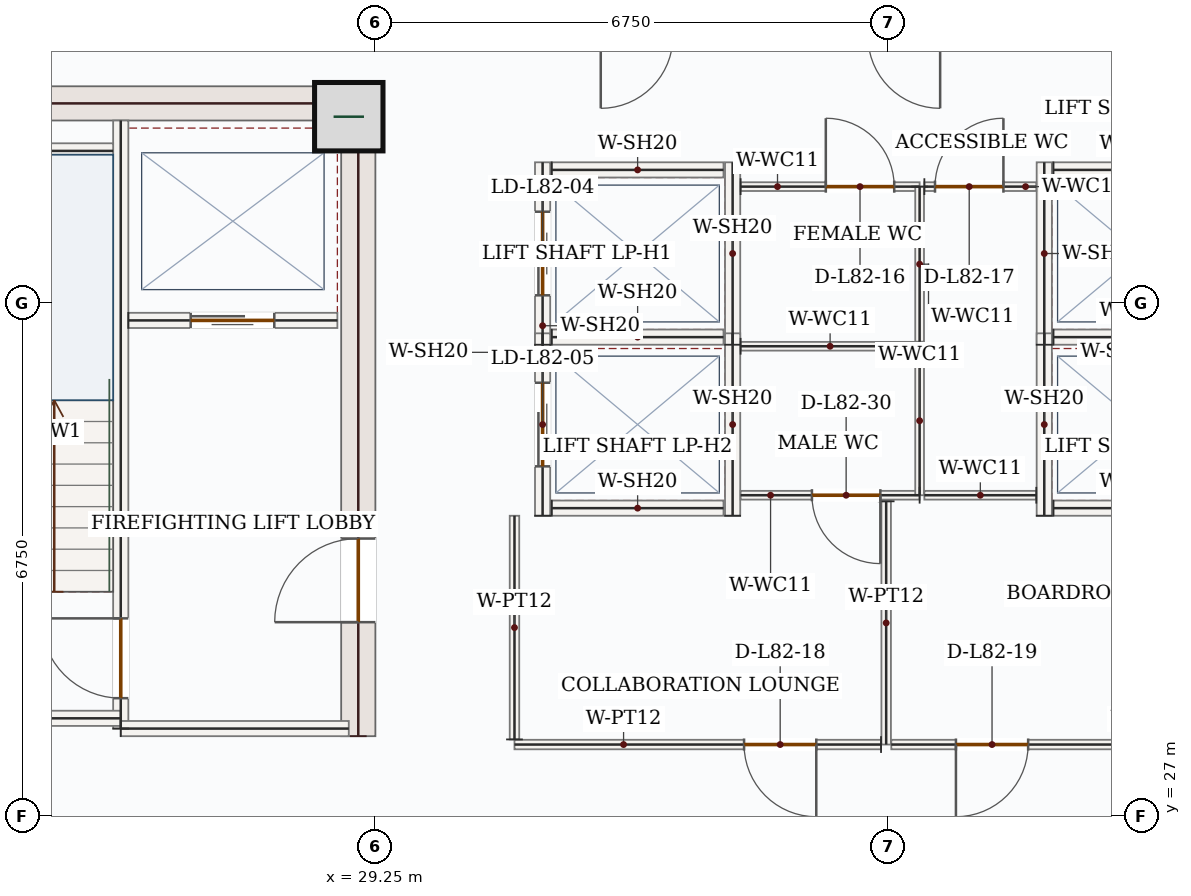
"""IFC4 building model, lengths in metres.
Left out: names, types, materials, properties, quantities, classifications, styles, units other than length and angle.
Written with IfcOpenShell. Run it as: python <this file> out.ifc"""

import sys

from ifc_helpers import new_model, si_unit, direction, frame, frame_2d, origin, origin_2d, place, context, subcontext, project, spatial, rectangle, extrude, source, transform, mapped, element, fill, save


model = new_model("IFC4")
c1 = context("Model", 3, precision=1e-05, world=origin(), true_north=direction((0.0, 1.0)))
c2 = subcontext(c1, "Body", "Model", "MODEL_VIEW")
j1 = project(units=[si_unit("LENGTHUNIT", "METRE"), si_unit("PLANEANGLEUNIT", "RADIAN")], contexts=[c1])
p1 = place(None, origin())
s1 = spatial("IfcSite", under=j1, at=p1, CompositionType="ELEMENT")
p2 = place(p1, origin())
s2 = spatial("IfcBuilding", under=s1, at=p2, CompositionType="ELEMENT")
p3 = place(p2, frame((0.0, 0.0, 338.55)))
s3 = spatial("IfcBuildingStorey", under=s2, at=p3, CompositionType="ELEMENT", Elevation=338.55)
p4 = place(p3, frame((29.025, 28.05, 0.0), z_axis=(0.0, 0.0, 1.0), x_axis=(0.0, 1.0, 0.0)))
e1 = element("IfcWall", 1, at=p4, inside=s3, PredefinedType="SHEAR", context=c2, shape_type="SweptSolid", body=[
    extrude(rectangle(XDim=8.55, YDim=0.45, at=frame_2d((4.275, 0.0))), origin(), (0.0, 0.0, 1.0), 3.5),
])
p5 = place(p4, frame((1.5, 0.0, 0.0)))
e2 = element("IfcOpeningElement", 2, at=p5, cuts=e1, PredefinedType="OPENING", context=c2, shape_type="SweptSolid", body=[
    extrude(rectangle(XDim=1.1, YDim=2.2, at=frame_2d((0.55, 1.1))), frame((0.0, 0.235, 0.0), z_axis=(0.0, -1.0, 0.0), x_axis=(1.0, 0.0, 0.0)), (0.0, 0.0, 1.0), 0.47),
])
m1 = source(origin(), c2, "Body", "SweptSolid", [
    extrude(rectangle(XDim=7.1, YDim=0.45, at=frame_2d((3.55, 0.0))), origin(), (0.0, 0.0, 1.0), 3.5),
])
p6 = place(p3, frame((21.7, 36.375, 0.0), z_axis=(0.0, 0.0, 1.0), x_axis=(1.0, 0.0, 0.0)))
e3 = element("IfcWall", 3, at=p6, inside=s3, PredefinedType="SHEAR", context=c2, shape_type="MappedRepresentation", body=[
    mapped(m1, transform((0.0, 0.0, 0.0), x_axis=(1.0, 0.0, 0.0), y_axis=(0.0, 1.0, 0.0), z_axis=(0.0, 0.0, 1.0), scale=1.0)),
])
m2 = source(origin(), c2, "Body", "SweptSolid", [
    extrude(rectangle(XDim=0.9, YDim=0.9, at=origin_2d()), origin(), (0.0, 0.0, 1.0), 3.75),
])
p7 = place(p3, frame((28.9, 36.2, 0.0), z_axis=(0.0, 0.0, 1.0), x_axis=(1.0, 0.0, 0.0)))
e4 = element("IfcColumn", 4, at=p7, inside=s3, PredefinedType="COLUMN", context=c2, shape_type="MappedRepresentation", body=[
    mapped(m2, transform((0.0, 0.0, 0.0), x_axis=(1.0, 0.0, 0.0), y_axis=(0.0, 1.0, 0.0), z_axis=(0.0, 0.0, 1.0), scale=1.0)),
])
p8 = place(p3, frame((25.9, 28.15, 0.0), z_axis=(0.0, 0.0, 1.0), x_axis=(0.0, 1.0, 0.0)))
e5 = element("IfcWall", 5, at=p8, inside=s3, PredefinedType="SOLIDWALL", context=c2, shape_type="SweptSolid", body=[
    extrude(rectangle(XDim=8.0, YDim=0.2, at=frame_2d((4.0, 0.0))), origin(), (0.0, 0.0, 1.0), 3.5),
])
p9 = place(p8, frame((0.4, 0.0, 0.0)))
e6 = element("IfcOpeningElement", 6, at=p9, cuts=e5, PredefinedType="OPENING", context=c2, shape_type="SweptSolid", body=[
    extrude(rectangle(XDim=1.05, YDim=2.15, at=frame_2d((0.525, 1.075))), frame((0.0, 0.11, 0.0), z_axis=(0.0, -1.0, 0.0), x_axis=(1.0, 0.0, 0.0)), (0.0, 0.0, 1.0), 0.22),
])
m3 = source(origin(), c2, "Body", "SweptSolid", [
    extrude(rectangle(XDim=4.25, YDim=0.2, at=frame_2d((2.125, 0.0))), origin(), (0.0, 0.0, 1.0), 3.5),
])
p10 = place(p3, frame((21.65, 28.285, 0.0), z_axis=(0.0, 0.0, 1.0), x_axis=(1.0, 0.0, 0.0)))
e7 = element("IfcWall", 7, at=p10, inside=s3, PredefinedType="SOLIDWALL", context=c2, shape_type="MappedRepresentation", body=[
    mapped(m3, transform((0.0, 0.0, 0.0), x_axis=(1.0, 0.0, 0.0), y_axis=(0.0, 1.0, 0.0), z_axis=(0.0, 0.0, 1.0), scale=1.0)),
])
m4 = source(origin(), c2, "Body", "SweptSolid", [
    extrude(rectangle(XDim=3.0, YDim=0.2, at=frame_2d((1.5, 0.0))), origin(), (0.0, 0.0, 1.0), 3.5),
])
p11 = place(p3, frame((25.9, 28.15, 0.0), z_axis=(0.0, 0.0, 1.0), x_axis=(1.0, 0.0, 0.0)))
e8 = element("IfcWall", 8, at=p11, inside=s3, PredefinedType="SOLIDWALL", context=c2, shape_type="MappedRepresentation", body=[
    mapped(m4, transform((0.0, 0.0, 0.0), x_axis=(1.0, 0.0, 0.0), y_axis=(0.0, 1.0, 0.0), z_axis=(0.0, 0.0, 1.0), scale=1.0)),
])
m5 = source(origin(), c2, "Body", "SweptSolid", [
    extrude(rectangle(XDim=3.25, YDim=0.2, at=frame_2d((1.625, 0.0))), origin(), (0.0, 0.0, 1.0), 3.5),
])
p12 = place(p3, frame((22.55, 35.75, 0.0), z_axis=(0.0, 0.0, 1.0), x_axis=(1.0, 0.0, 0.0)))
e9 = element("IfcWall", 9, at=p12, inside=s3, PredefinedType="SOLIDWALL", context=c2, shape_type="MappedRepresentation", body=[
    mapped(m5, transform((0.0, 0.0, 0.0), x_axis=(1.0, 0.0, 0.0), y_axis=(0.0, 1.0, 0.0), z_axis=(0.0, 0.0, 1.0), scale=1.0)),
])
p13 = place(p3, frame((26.0, 33.52, 0.0), z_axis=(0.0, 0.0, 1.0), x_axis=(1.0, 0.0, 0.0)))
e10 = element("IfcWall", 10, at=p13, inside=s3, PredefinedType="SOLIDWALL", context=c2, shape_type="SweptSolid", body=[
    extrude(rectangle(XDim=2.75, YDim=0.2, at=frame_2d((1.375, 0.0))), origin(), (0.0, 0.0, 1.0), 3.5),
])
p14 = place(p13, frame((0.82, 0.0, 0.0)))
e11 = element("IfcOpeningElement", 11, at=p14, cuts=e10, PredefinedType="OPENING", context=c2, shape_type="SweptSolid", body=[
    extrude(rectangle(XDim=1.1, YDim=2.15, at=frame_2d((0.55, 1.075))), frame((0.0, 0.11, 0.0), z_axis=(0.0, -1.0, 0.0), x_axis=(1.0, 0.0, 0.0)), (0.0, 0.0, 1.0), 0.22),
])
p15 = place(p3, frame((31.45, 33.2, 0.0), z_axis=(0.0, 0.0, 1.0), x_axis=(0.0, 1.0, 0.0)))
e12 = element("IfcWall", 12, at=p15, inside=s3, PredefinedType="SOLIDWALL", context=c2, shape_type="SweptSolid", body=[
    extrude(rectangle(XDim=2.4, YDim=0.2, at=frame_2d((1.2, 0.0))), origin(), (0.0, 0.0, 1.0), 3.5),
])
p16 = place(p15, frame((0.65, 0.0, 0.0)))
e13 = element("IfcOpeningElement", 13, at=p16, cuts=e12, PredefinedType="OPENING", context=c2, shape_type="SweptSolid", body=[
    extrude(rectangle(XDim=1.1, YDim=2.15, at=frame_2d((0.55, 1.075))), frame((0.0, 0.11, 0.0), z_axis=(0.0, -1.0, 0.0), x_axis=(1.0, 0.0, 0.0)), (0.0, 0.0, 1.0), 0.22),
])
m6 = source(origin(), c2, "Body", "SweptSolid", [
    extrude(rectangle(XDim=2.4, YDim=0.2, at=frame_2d((1.2, 0.0))), origin(), (0.0, 0.0, 1.0), 3.5),
])
p17 = place(p3, frame((33.95, 33.2, 0.0), z_axis=(0.0, 0.0, 1.0), x_axis=(0.0, 1.0, 0.0)))
e14 = element("IfcWall", 14, at=p17, inside=s3, PredefinedType="SOLIDWALL", context=c2, shape_type="MappedRepresentation", body=[
    mapped(m6, transform((0.0, 0.0, 0.0), x_axis=(1.0, 0.0, 0.0), y_axis=(0.0, 1.0, 0.0), z_axis=(0.0, 0.0, 1.0), scale=1.0)),
])
m7 = source(origin(), c2, "Body", "SweptSolid", [
    extrude(rectangle(XDim=2.26, YDim=0.2, at=frame_2d((1.13, 0.0))), origin(), (0.0, 0.0, 1.0), 3.5),
])
for number, where, z_axis, x_axis in (
    (15, (31.57, 33.3, 0.0), (0.0, 0.0, 1.0), (1.0, 0.0, 0.0)),
    (16, (31.57, 35.5, 0.0), (0.0, 0.0, 1.0), (1.0, 0.0, 0.0)),
):
    element("IfcWall", number, at=place(p3, frame(where, z_axis=z_axis, x_axis=x_axis)), inside=s3, PredefinedType="SOLIDWALL", context=c2, shape_type="MappedRepresentation", body=[
        mapped(m7, transform((0.0, 0.0, 0.0), x_axis=(1.0, 0.0, 0.0), y_axis=(0.0, 1.0, 0.0), z_axis=(0.0, 0.0, 1.0), scale=1.0)),
    ])
p18 = place(p3, frame((31.45, 30.95, 0.0), z_axis=(0.0, 0.0, 1.0), x_axis=(0.0, 1.0, 0.0)))
e17 = element("IfcWall", 17, at=p18, inside=s3, PredefinedType="SOLIDWALL", context=c2, shape_type="SweptSolid", body=[
    extrude(rectangle(XDim=2.4, YDim=0.2, at=frame_2d((1.2, 0.0))), origin(), (0.0, 0.0, 1.0), 3.5),
])
p19 = place(p18, frame((0.65, 0.0, 0.0)))
e18 = element("IfcOpeningElement", 18, at=p19, cuts=e17, PredefinedType="OPENING", context=c2, shape_type="SweptSolid", body=[
    extrude(rectangle(XDim=1.1, YDim=2.15, at=frame_2d((0.55, 1.075))), frame((0.0, 0.11, 0.0), z_axis=(0.0, -1.0, 0.0), x_axis=(1.0, 0.0, 0.0)), (0.0, 0.0, 1.0), 0.22),
])
p20 = place(p3, frame((33.95, 30.95, 0.0), z_axis=(0.0, 0.0, 1.0), x_axis=(0.0, 1.0, 0.0)))
e19 = element("IfcWall", 19, at=p20, inside=s3, PredefinedType="SOLIDWALL", context=c2, shape_type="MappedRepresentation", body=[
    mapped(m6, transform((0.0, 0.0, 0.0), x_axis=(1.0, 0.0, 0.0), y_axis=(0.0, 1.0, 0.0), z_axis=(0.0, 0.0, 1.0), scale=1.0)),
])
p21 = place(p3, frame((31.57, 31.05, 0.0), z_axis=(0.0, 0.0, 1.0), x_axis=(1.0, 0.0, 0.0)))
e20 = element("IfcWall", 20, at=p21, inside=s3, PredefinedType="SOLIDWALL", context=c2, shape_type="MappedRepresentation", body=[
    mapped(m7, transform((0.0, 0.0, 0.0), x_axis=(1.0, 0.0, 0.0), y_axis=(0.0, 1.0, 0.0), z_axis=(0.0, 0.0, 1.0), scale=1.0)),
])
p22 = place(p3, frame((38.05, 33.2, 0.0), z_axis=(0.0, 0.0, 1.0), x_axis=(0.0, 1.0, 0.0)))
e21 = element("IfcWall", 21, at=p22, inside=s3, PredefinedType="SOLIDWALL", context=c2, shape_type="MappedRepresentation", body=[
    mapped(m6, transform((0.0, 0.0, 0.0), x_axis=(1.0, 0.0, 0.0), y_axis=(0.0, 1.0, 0.0), z_axis=(0.0, 0.0, 1.0), scale=1.0)),
])
for number, where, z_axis, x_axis in (
    (22, (38.17, 33.3, 0.0), (0.0, 0.0, 1.0), (1.0, 0.0, 0.0)),
    (23, (38.17, 35.5, 0.0), (0.0, 0.0, 1.0), (1.0, 0.0, 0.0)),
):
    element("IfcWall", number, at=place(p3, frame(where, z_axis=z_axis, x_axis=x_axis)), inside=s3, PredefinedType="SOLIDWALL", context=c2, shape_type="MappedRepresentation", body=[
        mapped(m7, transform((0.0, 0.0, 0.0), x_axis=(1.0, 0.0, 0.0), y_axis=(0.0, 1.0, 0.0), z_axis=(0.0, 0.0, 1.0), scale=1.0)),
    ])
p23 = place(p3, frame((38.05, 30.95, 0.0), z_axis=(0.0, 0.0, 1.0), x_axis=(0.0, 1.0, 0.0)))
e24 = element("IfcWall", 24, at=p23, inside=s3, PredefinedType="SOLIDWALL", context=c2, shape_type="MappedRepresentation", body=[
    mapped(m6, transform((0.0, 0.0, 0.0), x_axis=(1.0, 0.0, 0.0), y_axis=(0.0, 1.0, 0.0), z_axis=(0.0, 0.0, 1.0), scale=1.0)),
])
p24 = place(p3, frame((38.17, 31.05, 0.0), z_axis=(0.0, 0.0, 1.0), x_axis=(1.0, 0.0, 0.0)))
e25 = element("IfcWall", 25, at=p24, inside=s3, PredefinedType="SOLIDWALL", context=c2, shape_type="MappedRepresentation", body=[
    mapped(m7, transform((0.0, 0.0, 0.0), x_axis=(1.0, 0.0, 0.0), y_axis=(0.0, 1.0, 0.0), z_axis=(0.0, 0.0, 1.0), scale=1.0)),
])
p25 = place(p3, frame((36.41, 31.22, 0.0), z_axis=(0.0, 0.0, 1.0), x_axis=(-1.0, 0.0, 0.0)))
e26 = element("IfcWall", 26, at=p25, inside=s3, PredefinedType="PARTITIONING", context=c2, shape_type="SweptSolid", body=[
    extrude(rectangle(XDim=2.355, YDim=0.115, at=frame_2d((1.177, 0.0))), origin(), (0.0, 0.0, 1.0), 3.5),
])
p26 = place(p25, frame((0.517, 0.0, 0.0)))
e27 = element("IfcOpeningElement", 27, at=p26, cuts=e26, PredefinedType="OPENING", context=c2, shape_type="SweptSolid", body=[
    extrude(rectangle(XDim=0.9, YDim=2.1, at=frame_2d((0.45, 1.05))), frame((0.0, 0.067, 0.0), z_axis=(0.0, -1.0, 0.0), x_axis=(1.0, 0.0, 0.0)), (0.0, 0.0, 1.0), 0.135),
])
m8 = source(origin(), c2, "Body", "SweptSolid", [
    extrude(rectangle(XDim=2.355, YDim=0.115, at=frame_2d((1.177, 0.0))), origin(), (0.0, 0.0, 1.0), 3.5),
])
p27 = place(p3, frame((34.055, 33.18, 0.0), z_axis=(0.0, 0.0, 1.0), x_axis=(1.0, 0.0, 0.0)))
e28 = element("IfcWall", 28, at=p27, inside=s3, PredefinedType="PARTITIONING", context=c2, shape_type="MappedRepresentation", body=[
    mapped(m8, transform((0.0, 0.0, 0.0), x_axis=(1.0, 0.0, 0.0), y_axis=(0.0, 1.0, 0.0), z_axis=(0.0, 0.0, 1.0), scale=1.0)),
])
m9 = source(origin(), c2, "Body", "SweptSolid", [
    extrude(rectangle(XDim=1.96, YDim=0.115, at=frame_2d((0.98, 0.0))), origin(), (0.0, 0.0, 1.0), 3.5),
])
p28 = place(p3, frame((36.41, 33.18, 0.0), z_axis=(0.0, 0.0, 1.0), x_axis=(0.0, -1.0, 0.0)))
e29 = element("IfcWall", 29, at=p28, inside=s3, PredefinedType="PARTITIONING", context=c2, shape_type="MappedRepresentation", body=[
    mapped(m9, transform((0.0, 0.0, 0.0), x_axis=(1.0, 0.0, 0.0), y_axis=(0.0, 1.0, 0.0), z_axis=(0.0, 0.0, 1.0), scale=1.0)),
])
p29 = place(p3, frame((34.055, 35.28, 0.0), z_axis=(0.0, 0.0, 1.0), x_axis=(1.0, 0.0, 0.0)))
e30 = element("IfcWall", 30, at=p29, inside=s3, PredefinedType="PARTITIONING", context=c2, shape_type="SweptSolid", body=[
    extrude(rectangle(XDim=2.355, YDim=0.115, at=frame_2d((1.177, 0.0))), origin(), (0.0, 0.0, 1.0), 3.5),
])
p30 = place(p29, frame((1.121, 0.0, 0.0)))
e31 = element("IfcOpeningElement", 31, at=p30, cuts=e30, PredefinedType="OPENING", context=c2, shape_type="SweptSolid", body=[
    extrude(rectangle(XDim=0.9, YDim=2.1, at=frame_2d((0.45, 1.05))), frame((0.0, 0.067, 0.0), z_axis=(0.0, -1.0, 0.0), x_axis=(1.0, 0.0, 0.0)), (0.0, 0.0, 1.0), 0.135),
])
m10 = source(origin(), c2, "Body", "SweptSolid", [
    extrude(rectangle(XDim=2.04, YDim=0.115, at=frame_2d((1.02, 0.0))), origin(), (0.0, 0.0, 1.0), 3.5),
])
p31 = place(p3, frame((36.41, 35.28, 0.0), z_axis=(0.0, 0.0, 1.0), x_axis=(0.0, -1.0, 0.0)))
e32 = element("IfcWall", 32, at=p31, inside=s3, PredefinedType="PARTITIONING", context=c2, shape_type="MappedRepresentation", body=[
    mapped(m10, transform((0.0, 0.0, 0.0), x_axis=(1.0, 0.0, 0.0), y_axis=(0.0, 1.0, 0.0), z_axis=(0.0, 0.0, 1.0), scale=1.0)),
])
m11 = source(origin(), c2, "Body", "SweptSolid", [
    extrude(rectangle(XDim=1.473, YDim=0.115, at=frame_2d((0.736, 0.0))), origin(), (0.0, 0.0, 1.0), 3.5),
])
p32 = place(p3, frame((37.945, 31.22, 0.0), z_axis=(0.0, 0.0, 1.0), x_axis=(-1.0, 0.0, 0.0)))
e33 = element("IfcWall", 33, at=p32, inside=s3, PredefinedType="PARTITIONING", context=c2, shape_type="MappedRepresentation", body=[
    mapped(m11, transform((0.0, 0.0, 0.0), x_axis=(1.0, 0.0, 0.0), y_axis=(0.0, 1.0, 0.0), z_axis=(0.0, 0.0, 1.0), scale=1.0)),
])
p33 = place(p3, frame((36.472, 35.28, 0.0), z_axis=(0.0, 0.0, 1.0), x_axis=(1.0, 0.0, 0.0)))
e34 = element("IfcWall", 34, at=p33, inside=s3, PredefinedType="PARTITIONING", context=c2, shape_type="SweptSolid", body=[
    extrude(rectangle(XDim=1.473, YDim=0.115, at=frame_2d((0.736, 0.0))), origin(), (0.0, 0.0, 1.0), 3.5),
])
p34 = place(p33, frame((0.14, 0.0, 0.0)))
e35 = element("IfcOpeningElement", 35, at=p34, cuts=e34, PredefinedType="OPENING", context=c2, shape_type="SweptSolid", body=[
    extrude(rectangle(XDim=0.9, YDim=2.1, at=frame_2d((0.45, 1.05))), frame((0.0, 0.067, 0.0), z_axis=(0.0, -1.0, 0.0), x_axis=(1.0, 0.0, 0.0)), (0.0, 0.0, 1.0), 0.135),
])
m12 = source(origin(), c2, "Body", "SweptSolid", [
    extrude(rectangle(XDim=3.2, YDim=0.125, at=frame_2d((1.6, 0.0))), origin(), (0.0, 0.0, 1.0), 3.5),
])
p35 = place(p3, frame((35.97, 31.14, 0.0), z_axis=(0.0, 0.0, 1.0), x_axis=(0.0, -1.0, 0.0)))
e36 = element("IfcWall", 36, at=p35, inside=s3, PredefinedType="PARTITIONING", context=c2, shape_type="MappedRepresentation", body=[
    mapped(m12, transform((0.0, 0.0, 0.0), x_axis=(1.0, 0.0, 0.0), y_axis=(0.0, 1.0, 0.0), z_axis=(0.0, 0.0, 1.0), scale=1.0)),
])
p36 = place(p3, frame((35.903, 27.94, 0.0), z_axis=(0.0, 0.0, 1.0), x_axis=(-1.0, 0.0, 0.0)))
e37 = element("IfcWall", 37, at=p36, inside=s3, PredefinedType="PARTITIONING", context=c2, shape_type="SweptSolid", body=[
    extrude(rectangle(XDim=4.823, YDim=0.125, at=frame_2d((2.411, 0.0))), origin(), (0.0, 0.0, 1.0), 3.5),
])
p37 = place(p36, frame((0.852, 0.0, 0.0)))
e38 = element("IfcOpeningElement", 38, at=p37, cuts=e37, PredefinedType="OPENING", context=c2, shape_type="SweptSolid", body=[
    extrude(rectangle(XDim=0.95, YDim=2.15, at=frame_2d((0.475, 1.075))), frame((0.0, 0.073, 0.0), z_axis=(0.0, -1.0, 0.0), x_axis=(1.0, 0.0, 0.0)), (0.0, 0.0, 1.0), 0.145),
])
m13 = source(origin(), c2, "Body", "SweptSolid", [
    extrude(rectangle(XDim=2.942, YDim=0.125, at=frame_2d((1.471, 0.0))), origin(), (0.0, 0.0, 1.0), 3.5),
])
p38 = place(p3, frame((31.08, 28.008, 0.0), z_axis=(0.0, 0.0, 1.0), x_axis=(0.0, 1.0, 0.0)))
e39 = element("IfcWall", 39, at=p38, inside=s3, PredefinedType="PARTITIONING", context=c2, shape_type="MappedRepresentation", body=[
    mapped(m13, transform((0.0, 0.0, 0.0), x_axis=(1.0, 0.0, 0.0), y_axis=(0.0, 1.0, 0.0), z_axis=(0.0, 0.0, 1.0), scale=1.0)),
])
p39 = place(p3, frame((40.853, 27.94, 0.0), z_axis=(0.0, 0.0, 1.0), x_axis=(-1.0, 0.0, 0.0)))
e40 = element("IfcWall", 40, at=p39, inside=s3, PredefinedType="PARTITIONING", context=c2, shape_type="SweptSolid", body=[
    extrude(rectangle(XDim=4.815, YDim=0.125, at=frame_2d((2.407, 0.0))), origin(), (0.0, 0.0, 1.0), 3.5),
])
p40 = place(p39, frame((3.015, 0.0, 0.0)))
e41 = element("IfcOpeningElement", 41, at=p40, cuts=e40, PredefinedType="OPENING", context=c2, shape_type="SweptSolid", body=[
    extrude(rectangle(XDim=0.95, YDim=2.15, at=frame_2d((0.475, 1.075))), frame((0.0, 0.073, 0.0), z_axis=(0.0, -1.0, 0.0), x_axis=(1.0, 0.0, 0.0)), (0.0, 0.0, 1.0), 0.145),
])
m14 = source(origin(), c2, "Body", "SweptSolid", [
    extrude(rectangle(XDim=1.05, YDim=2.15, at=frame_2d((0.525, 1.075))), frame((0.0, 0.025, 0.0), z_axis=(0.0, -1.0, 0.0), x_axis=(1.0, 0.0, 0.0)), (0.0, 0.0, 1.0), 0.05),
])
p41 = place(p9, origin())
e42 = element("IfcDoor", 42, at=p41, inside=s3, OperationType="SINGLE_SWING_RIGHT", PredefinedType="DOOR", context=c2, shape_type="MappedRepresentation", body=[
    mapped(m14, transform((0.0, 0.0, 0.0), x_axis=(1.0, 0.0, 0.0), y_axis=(0.0, 1.0, 0.0), z_axis=(0.0, 0.0, 1.0), scale=1.0)),
])
fill(e6, e42)
m15 = source(origin(), c2, "Body", "SweptSolid", [
    extrude(rectangle(XDim=1.1, YDim=2.15, at=frame_2d((0.55, 1.075))), frame((0.0, 0.025, 0.0), z_axis=(0.0, -1.0, 0.0), x_axis=(1.0, 0.0, 0.0)), (0.0, 0.0, 1.0), 0.05),
])
p42 = place(p14, origin())
e43 = element("IfcDoor", 43, at=p42, inside=s3, OperationType="DOUBLE_DOOR_SLIDING", PredefinedType="DOOR", context=c2, shape_type="MappedRepresentation", body=[
    mapped(m15, transform((0.0, 0.0, 0.0), x_axis=(1.0, 0.0, 0.0), y_axis=(0.0, 1.0, 0.0), z_axis=(0.0, 0.0, 1.0), scale=1.0)),
])
fill(e11, e43)
m16 = source(origin(), c2, "Body", "SweptSolid", [
    extrude(rectangle(XDim=1.1, YDim=2.2, at=frame_2d((0.55, 1.1))), frame((0.0, 0.025, 0.0), z_axis=(0.0, -1.0, 0.0), x_axis=(1.0, 0.0, 0.0)), (0.0, 0.0, 1.0), 0.05),
])
p43 = place(p5, origin())
e44 = element("IfcDoor", 44, at=p43, inside=s3, OperationType="SINGLE_SWING_LEFT", PredefinedType="DOOR", context=c2, shape_type="MappedRepresentation", body=[
    mapped(m16, transform((0.0, 0.0, 0.0), x_axis=(1.0, 0.0, 0.0), y_axis=(0.0, 1.0, 0.0), z_axis=(0.0, 0.0, 1.0), scale=1.0)),
])
fill(e2, e44)
p44 = place(p16, origin())
e45 = element("IfcDoor", 45, at=p44, inside=s3, OperationType="DOUBLE_DOOR_SLIDING", PredefinedType="DOOR", context=c2, shape_type="MappedRepresentation", body=[
    mapped(m15, transform((0.0, 0.0, 0.0), x_axis=(1.0, 0.0, 0.0), y_axis=(0.0, 1.0, 0.0), z_axis=(0.0, 0.0, 1.0), scale=1.0)),
])
fill(e13, e45)
p45 = place(p19, origin())
e46 = element("IfcDoor", 46, at=p45, inside=s3, OperationType="DOUBLE_DOOR_SLIDING", PredefinedType="DOOR", context=c2, shape_type="MappedRepresentation", body=[
    mapped(m15, transform((0.0, 0.0, 0.0), x_axis=(1.0, 0.0, 0.0), y_axis=(0.0, 1.0, 0.0), z_axis=(0.0, 0.0, 1.0), scale=1.0)),
])
fill(e18, e46)
m17 = source(origin(), c2, "Body", "SweptSolid", [
    extrude(rectangle(XDim=0.9, YDim=2.1, at=frame_2d((0.45, 1.05))), frame((0.0, 0.025, 0.0), z_axis=(0.0, -1.0, 0.0), x_axis=(1.0, 0.0, 0.0)), (0.0, 0.0, 1.0), 0.05),
])
p46 = place(p30, origin())
e47 = element("IfcDoor", 47, at=p46, inside=s3, OperationType="SINGLE_SWING_LEFT", PredefinedType="DOOR", context=c2, shape_type="MappedRepresentation", body=[
    mapped(m17, transform((0.0, 0.0, 0.0), x_axis=(1.0, 0.0, 0.0), y_axis=(0.0, 1.0, 0.0), z_axis=(0.0, 0.0, 1.0), scale=1.0)),
])
fill(e31, e47)
p47 = place(p34, origin())
e48 = element("IfcDoor", 48, at=p47, inside=s3, OperationType="SINGLE_SWING_RIGHT", PredefinedType="DOOR", context=c2, shape_type="MappedRepresentation", body=[
    mapped(m17, transform((0.0, 0.0, 0.0), x_axis=(1.0, 0.0, 0.0), y_axis=(0.0, 1.0, 0.0), z_axis=(0.0, 0.0, 1.0), scale=1.0)),
])
fill(e35, e48)
m18 = source(origin(), c2, "Body", "SweptSolid", [
    extrude(rectangle(XDim=0.95, YDim=2.15, at=frame_2d((0.475, 1.075))), frame((0.0, 0.025, 0.0), z_axis=(0.0, -1.0, 0.0), x_axis=(1.0, 0.0, 0.0)), (0.0, 0.0, 1.0), 0.05),
])
p48 = place(p37, origin())
e49 = element("IfcDoor", 49, at=p48, inside=s3, OperationType="SINGLE_SWING_LEFT", PredefinedType="DOOR", context=c2, shape_type="MappedRepresentation", body=[
    mapped(m18, transform((0.0, 0.0, 0.0), x_axis=(1.0, 0.0, 0.0), y_axis=(0.0, 1.0, 0.0), z_axis=(0.0, 0.0, 1.0), scale=1.0)),
])
fill(e38, e49)
p49 = place(p40, origin())
e50 = element("IfcDoor", 50, at=p49, inside=s3, OperationType="SINGLE_SWING_RIGHT", PredefinedType="DOOR", context=c2, shape_type="MappedRepresentation", body=[
    mapped(m18, transform((0.0, 0.0, 0.0), x_axis=(1.0, 0.0, 0.0), y_axis=(0.0, 1.0, 0.0), z_axis=(0.0, 0.0, 1.0), scale=1.0)),
])
fill(e41, e50)
p50 = place(p26, origin())
e51 = element("IfcDoor", 51, at=p50, inside=s3, OperationType="SINGLE_SWING_LEFT", PredefinedType="DOOR", context=c2, shape_type="MappedRepresentation", body=[
    mapped(m17, transform((0.0, 0.0, 0.0), x_axis=(1.0, 0.0, 0.0), y_axis=(0.0, 1.0, 0.0), z_axis=(0.0, 0.0, 1.0), scale=1.0)),
])
fill(e27, e51)
save(model, sys.argv[1])
